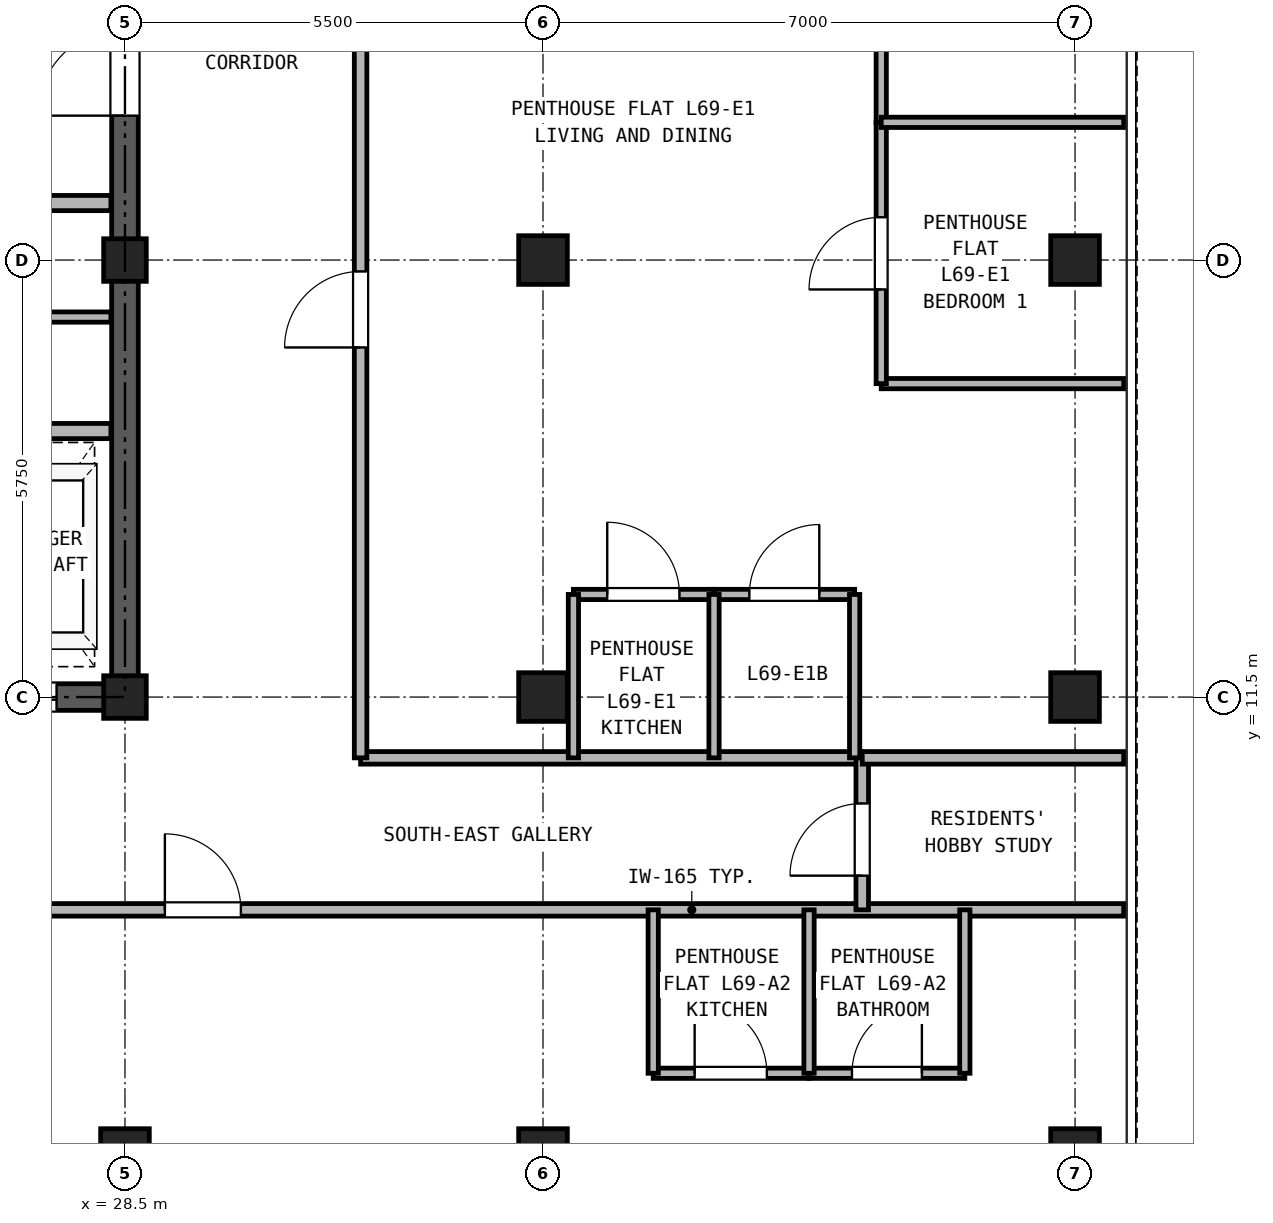
"""IFC4 building model, lengths in metres.
Left out: names, types, materials, properties, quantities, classifications, styles, units other than length and angle.
Written with IfcOpenShell. Run it as: python <this file> out.ifc"""

import sys

from ifc_helpers import new_model, si_unit, direction, frame, frame_2d, origin, origin_2d, place, context, subcontext, project, spatial, rectangle, hollow_rectangle, extrude, source, transform, mapped, element, fill, save


model = new_model("IFC4")
c1 = context("Model", 3, precision=1e-05, world=origin(), true_north=direction((0.0, 1.0)))
c2 = subcontext(c1, "Body", "Model", "MODEL_VIEW")
j1 = project(units=[si_unit("LENGTHUNIT", "METRE"), si_unit("PLANEANGLEUNIT", "RADIAN")], contexts=[c1])
p1 = place(None, origin())
s1 = spatial("IfcSite", under=j1, at=p1, CompositionType="ELEMENT")
p2 = place(p1, origin())
s2 = spatial("IfcBuilding", under=s1, at=p2, CompositionType="ELEMENT")
p3 = place(p2, frame((0.0, 0.0, 242.5)))
s3 = spatial("IfcBuildingStorey", under=s2, at=p3, CompositionType="ELEMENT", Elevation=242.5)
m1 = source(origin(), c2, "Body", "SweptSolid", [
    extrude(hollow_rectangle(XDim=0.64, YDim=0.64, WallThickness=0.035, at=origin_2d()), origin(), (0.0, 0.0, 1.0), 2.98),
])
for number, where, z_axis, x_axis in (
    (1, (41.0, 5.5, 0.0), (0.0, 0.0, 1.0), (1.0, 0.0, 0.0)),
    (2, (41.0, 11.5, 0.0), (0.0, 0.0, 1.0), (1.0, 0.0, 0.0)),
    (3, (41.0, 17.25, 0.0), (0.0, 0.0, 1.0), (1.0, 0.0, 0.0)),
    (4, (28.5, 5.5, 0.0), (0.0, 0.0, 1.0), (1.0, 0.0, 0.0)),
):
    element("IfcColumn", number, at=place(p3, frame(where, z_axis=z_axis, x_axis=x_axis)), inside=s3, PredefinedType="COLUMN", context=c2, shape_type="MappedRepresentation", body=[
        mapped(m1, transform((0.0, 0.0, 0.0), x_axis=(1.0, 0.0, 0.0), y_axis=(0.0, 1.0, 0.0), z_axis=(0.0, 0.0, 1.0), scale=1.0)),
    ])
m2 = source(origin(), c2, "Body", "SweptSolid", [
    extrude(hollow_rectangle(XDim=0.56, YDim=0.56, WallThickness=0.03, at=origin_2d()), origin(), (0.0, 0.0, 1.0), 2.98),
])
for number, where, z_axis, x_axis in (
    (5, (28.5, 11.5, 0.0), (0.0, 0.0, 1.0), (1.0, 0.0, 0.0)),
    (6, (28.5, 17.25, 0.0), (0.0, 0.0, 1.0), (1.0, 0.0, 0.0)),
):
    element("IfcColumn", number, at=place(p3, frame(where, z_axis=z_axis, x_axis=x_axis)), inside=s3, PredefinedType="COLUMN", context=c2, shape_type="MappedRepresentation", body=[
        mapped(m2, transform((0.0, 0.0, 0.0), x_axis=(1.0, 0.0, 0.0), y_axis=(0.0, 1.0, 0.0), z_axis=(0.0, 0.0, 1.0), scale=1.0)),
    ])
for number, where, z_axis, x_axis in (
    (7, (34.0, 5.5, 0.0), (0.0, 0.0, 1.0), (1.0, 0.0, 0.0)),
    (8, (34.0, 11.5, 0.0), (0.0, 0.0, 1.0), (1.0, 0.0, 0.0)),
    (9, (34.0, 17.25, 0.0), (0.0, 0.0, 1.0), (1.0, 0.0, 0.0)),
):
    element("IfcColumn", number, at=place(p3, frame(where, z_axis=z_axis, x_axis=x_axis)), inside=s3, PredefinedType="COLUMN", context=c2, shape_type="MappedRepresentation", body=[
        mapped(m1, transform((0.0, 0.0, 0.0), x_axis=(1.0, 0.0, 0.0), y_axis=(0.0, 1.0, 0.0), z_axis=(0.0, 0.0, 1.0), scale=1.0)),
    ])
p4 = place(p3, frame((18.325, 11.5, 0.0), z_axis=(0.0, 0.0, 1.0), x_axis=(1.0, 0.0, 0.0)))
e10 = element("IfcWall", 10, at=p4, inside=s3, PredefinedType="SHEAR", context=c2, shape_type="SweptSolid", body=[
    extrude(rectangle(XDim=10.35, YDim=0.35, at=frame_2d((5.175, 0.0))), origin(), (0.0, 0.0, 1.0), 2.98),
])
p5 = place(p4, frame((1.775, 0.0, 0.0)))
e11 = element("IfcOpeningElement", 11, at=p5, cuts=e10, PredefinedType="OPENING", context=c2, shape_type="SweptSolid", body=[
    extrude(rectangle(XDim=0.95, YDim=2.15, at=frame_2d((0.475, 1.075))), frame((0.0, 0.185, 0.0), z_axis=(0.0, -1.0, 0.0), x_axis=(1.0, 0.0, 0.0)), (0.0, 0.0, 1.0), 0.37),
])
p6 = place(p4, frame((5.275, 0.0, 0.0)))
e12 = element("IfcOpeningElement", 12, at=p6, cuts=e10, PredefinedType="OPENING", context=c2, shape_type="SweptSolid", body=[
    extrude(rectangle(XDim=0.95, YDim=2.15, at=frame_2d((0.475, 1.075))), frame((0.0, 0.185, 0.0), z_axis=(0.0, -1.0, 0.0), x_axis=(1.0, 0.0, 0.0)), (0.0, 0.0, 1.0), 0.37),
])
p7 = place(p4, frame((8.175, 0.0, 0.0)))
e13 = element("IfcOpeningElement", 13, at=p7, cuts=e10, PredefinedType="OPENING", context=c2, shape_type="SweptSolid", body=[
    extrude(rectangle(XDim=1.1, YDim=2.25, at=frame_2d((0.55, 1.125))), frame((0.0, 0.185, 0.0), z_axis=(0.0, -1.0, 0.0), x_axis=(1.0, 0.0, 0.0)), (0.0, 0.0, 1.0), 0.37),
])
p8 = place(p3, frame((28.5, 11.675, 0.0), z_axis=(0.0, 0.0, 1.0), x_axis=(0.0, 1.0, 0.0)))
e14 = element("IfcWall", 14, at=p8, inside=s3, PredefinedType="SHEAR", context=c2, shape_type="SweptSolid", body=[
    extrude(rectangle(XDim=16.9, YDim=0.35, at=frame_2d((8.45, 0.0))), origin(), (0.0, 0.0, 1.0), 2.98),
])
p9 = place(p8, frame((7.475, 0.0, 0.0)))
e15 = element("IfcOpeningElement", 15, at=p9, cuts=e14, PredefinedType="OPENING", context=c2, shape_type="SweptSolid", body=[
    extrude(rectangle(XDim=1.15, YDim=2.2, at=frame_2d((0.575, 1.1))), frame((0.0, 0.185, 0.0), z_axis=(0.0, -1.0, 0.0), x_axis=(1.0, 0.0, 0.0)), (0.0, 0.0, 1.0), 0.37),
])
p10 = place(p3, frame((18.685, 18.0, 0.0), z_axis=(0.0, 0.0, 1.0), x_axis=(1.0, 0.0, 0.0)))
e16 = element("IfcWall", 16, at=p10, inside=s3, PredefinedType="PARTITIONING", context=c2, shape_type="SweptSolid", body=[
    extrude(rectangle(XDim=9.63, YDim=0.2, at=frame_2d((4.815, 0.0))), origin(), (0.0, 0.0, 1.0), 2.98),
])
p11 = place(p10, frame((0.565, 0.0, 0.0)))
e17 = element("IfcOpeningElement", 17, at=p11, cuts=e16, PredefinedType="OPENING", context=c2, shape_type="SweptSolid", body=[
    extrude(rectangle(XDim=1.3, YDim=2.3, at=frame_2d((0.65, 1.15))), frame((0.0, 0.11, 0.0), z_axis=(0.0, -1.0, 0.0), x_axis=(1.0, 0.0, 0.0)), (0.0, 0.0, 1.0), 0.22),
])
p12 = place(p10, frame((2.665, 0.0, 0.0)))
e18 = element("IfcOpeningElement", 18, at=p12, cuts=e16, PredefinedType="OPENING", context=c2, shape_type="SweptSolid", body=[
    extrude(rectangle(XDim=1.3, YDim=2.3, at=frame_2d((0.65, 1.15))), frame((0.0, 0.11, 0.0), z_axis=(0.0, -1.0, 0.0), x_axis=(1.0, 0.0, 0.0)), (0.0, 0.0, 1.0), 0.22),
])
p13 = place(p10, frame((7.165, 0.0, 0.0)))
e19 = element("IfcOpeningElement", 19, at=p13, cuts=e16, PredefinedType="OPENING", context=c2, shape_type="SweptSolid", body=[
    extrude(rectangle(XDim=1.0, YDim=2.15, at=frame_2d((0.5, 1.075))), frame((0.0, 0.11, 0.0), z_axis=(0.0, -1.0, 0.0), x_axis=(1.0, 0.0, 0.0)), (0.0, 0.0, 1.0), 0.22),
])
p14 = place(p3, frame((18.685, 15.0, 0.0), z_axis=(0.0, 0.0, 1.0), x_axis=(1.0, 0.0, 0.0)))
e20 = element("IfcWall", 20, at=p14, inside=s3, PredefinedType="PARTITIONING", context=c2, shape_type="SweptSolid", body=[
    extrude(rectangle(XDim=9.63, YDim=0.2, at=frame_2d((4.815, 0.0))), origin(), (0.0, 0.0, 1.0), 2.98),
])
p15 = place(p3, frame((23.3, 16.5, 0.0), z_axis=(0.0, 0.0, 1.0), x_axis=(1.0, 0.0, 0.0)))
e21 = element("IfcWall", 21, at=p15, inside=s3, PredefinedType="PARTITIONING", context=c2, shape_type="SweptSolid", body=[
    extrude(rectangle(XDim=5.015, YDim=0.135, at=frame_2d((2.507, 0.0))), origin(), (0.0, 0.0, 1.0), 2.98),
])
p16 = place(p15, frame((2.55, 0.0, 0.0)))
e22 = element("IfcOpeningElement", 22, at=p16, cuts=e21, PredefinedType="OPENING", context=c2, shape_type="SweptSolid", body=[
    extrude(rectangle(XDim=0.9, YDim=2.05, at=frame_2d((0.45, 1.025))), frame((0.0, 0.077, 0.0), z_axis=(0.0, -1.0, 0.0), x_axis=(1.0, 0.0, 0.0)), (0.0, 0.0, 1.0), 0.155),
])
p17 = place(p3, frame((5.36, 8.7, 0.0), z_axis=(0.0, 0.0, 1.0), x_axis=(1.0, 0.0, 0.0)))
e23 = element("IfcWall", 23, at=p17, inside=s3, PredefinedType="PARTITIONING", context=c2, shape_type="SweptSolid", body=[
    extrude(rectangle(XDim=36.28, YDim=0.165, at=frame_2d((18.14, 0.0))), origin(), (0.0, 0.0, 1.0), 2.655),
])
p18 = place(p17, frame((11.615, 0.0, 0.0)))
e24 = element("IfcOpeningElement", 24, at=p18, cuts=e23, PredefinedType="OPENING", context=c2, shape_type="SweptSolid", body=[
    extrude(rectangle(XDim=1.0, YDim=2.15, at=frame_2d((0.5, 1.075))), frame((0.0, 0.093, 0.0), z_axis=(0.0, -1.0, 0.0), x_axis=(1.0, 0.0, 0.0)), (0.0, 0.0, 1.0), 0.185),
])
p19 = place(p17, frame((23.665, 0.0, 0.0)))
e25 = element("IfcOpeningElement", 25, at=p19, cuts=e23, PredefinedType="OPENING", context=c2, shape_type="SweptSolid", body=[
    extrude(rectangle(XDim=1.0, YDim=2.15, at=frame_2d((0.5, 1.075))), frame((0.0, 0.093, 0.0), z_axis=(0.0, -1.0, 0.0), x_axis=(1.0, 0.0, 0.0)), (0.0, 0.0, 1.0), 0.185),
])
p20 = place(p3, frame((31.6, 10.7, 0.0), z_axis=(0.0, 0.0, 1.0), x_axis=(1.0, 0.0, 0.0)))
e26 = element("IfcWall", 26, at=p20, inside=s3, PredefinedType="PARTITIONING", context=c2, shape_type="SweptSolid", body=[
    extrude(rectangle(XDim=6.6, YDim=0.165, at=frame_2d((3.3, 0.0))), origin(), (0.0, 0.0, 1.0), 2.98),
])
p21 = place(p3, frame((38.2, 8.7, 0.0), z_axis=(0.0, 0.0, 1.0), x_axis=(0.0, 1.0, 0.0)))
e27 = element("IfcWall", 27, at=p21, inside=s3, PredefinedType="PARTITIONING", context=c2, shape_type="SweptSolid", body=[
    extrude(rectangle(XDim=2.0, YDim=0.165, at=frame_2d((1.0, 0.0))), origin(), (0.0, 0.0, 1.0), 2.98),
])
p22 = place(p21, frame((0.45, 0.0, 0.0)))
e28 = element("IfcOpeningElement", 28, at=p22, cuts=e27, PredefinedType="OPENING", context=c2, shape_type="SweptSolid", body=[
    extrude(rectangle(XDim=0.95, YDim=2.15, at=frame_2d((0.475, 1.075))), frame((0.0, 0.093, 0.0), z_axis=(0.0, -1.0, 0.0), x_axis=(1.0, 0.0, 0.0)), (0.0, 0.0, 1.0), 0.185),
])
p23 = place(p3, frame((31.6, 10.7, 0.0), z_axis=(0.0, 0.0, 1.0), x_axis=(0.0, 1.0, 0.0)))
e29 = element("IfcWall", 29, at=p23, inside=s3, PredefinedType="PARTITIONING", context=c2, shape_type="SweptSolid", body=[
    extrude(rectangle(XDim=24.44, YDim=0.165, at=frame_2d((12.22, 0.0))), origin(), (0.0, 0.0, 1.0), 2.98),
])
p24 = place(p23, frame((5.4, 0.0, 0.0)))
e30 = element("IfcOpeningElement", 30, at=p24, cuts=e29, PredefinedType="OPENING", context=c2, shape_type="SweptSolid", body=[
    extrude(rectangle(XDim=1.0, YDim=2.15, at=frame_2d((0.5, 1.075))), frame((0.0, 0.093, 0.0), z_axis=(0.0, -1.0, 0.0), x_axis=(1.0, 0.0, 0.0)), (0.0, 0.0, 1.0), 0.185),
])
p25 = place(p23, frame((15.7, 0.0, 0.0)))
e31 = element("IfcOpeningElement", 31, at=p25, cuts=e29, PredefinedType="OPENING", context=c2, shape_type="SweptSolid", body=[
    extrude(rectangle(XDim=1.0, YDim=2.15, at=frame_2d((0.5, 1.075))), frame((0.0, 0.093, 0.0), z_axis=(0.0, -1.0, 0.0), x_axis=(1.0, 0.0, 0.0)), (0.0, 0.0, 1.0), 0.185),
])
p26 = place(p3, frame((35.45, 6.55, 0.0), z_axis=(0.0, 0.0, 1.0), x_axis=(1.0, 0.0, 0.0)))
e32 = element("IfcWall", 32, at=p26, inside=s3, PredefinedType="PARTITIONING", context=c2, shape_type="SweptSolid", body=[
    extrude(rectangle(XDim=2.05, YDim=0.135, at=frame_2d((1.025, 0.0))), origin(), (0.0, 0.0, 1.0), 2.98),
])
p27 = place(p26, frame((0.545, 0.0, 0.0)))
e33 = element("IfcOpeningElement", 33, at=p27, cuts=e32, PredefinedType="OPENING", context=c2, shape_type="SweptSolid", body=[
    extrude(rectangle(XDim=0.95, YDim=2.15, at=frame_2d((0.475, 1.075))), frame((0.0, 0.077, 0.0), z_axis=(0.0, -1.0, 0.0), x_axis=(1.0, 0.0, 0.0)), (0.0, 0.0, 1.0), 0.155),
])
p28 = place(p3, frame((37.5, 6.55, 0.0), z_axis=(0.0, 0.0, 1.0), x_axis=(1.0, 0.0, 0.0)))
e34 = element("IfcWall", 34, at=p28, inside=s3, PredefinedType="PARTITIONING", context=c2, shape_type="SweptSolid", body=[
    extrude(rectangle(XDim=2.05, YDim=0.135, at=frame_2d((1.025, 0.0))), origin(), (0.0, 0.0, 1.0), 2.98),
])
p29 = place(p28, frame((0.565, 0.0, 0.0)))
e35 = element("IfcOpeningElement", 35, at=p29, cuts=e34, PredefinedType="OPENING", context=c2, shape_type="SweptSolid", body=[
    extrude(rectangle(XDim=0.92, YDim=2.1, at=frame_2d((0.46, 1.05))), frame((0.0, 0.077, 0.0), z_axis=(0.0, -1.0, 0.0), x_axis=(1.0, 0.0, 0.0)), (0.0, 0.0, 1.0), 0.155),
])
for number, where, z_axis, x_axis in (
    (36, (35.45, 6.55, 0.0), (0.0, 0.0, 1.0), (0.0, 1.0, 0.0)),
    (37, (37.5, 6.55, 0.0), (0.0, 0.0, 1.0), (0.0, 1.0, 0.0)),
    (38, (39.55, 6.55, 0.0), (0.0, 0.0, 1.0), (0.0, 1.0, 0.0)),
):
    element("IfcWall", number, at=place(p3, frame(where, z_axis=z_axis, x_axis=x_axis)), inside=s3, PredefinedType="PARTITIONING", context=c2, shape_type="SweptSolid", body=[
        extrude(rectangle(XDim=2.15, YDim=0.135, at=frame_2d((1.075, 0.0))), origin(), (0.0, 0.0, 1.0), 2.98),
    ])
p30 = place(p3, frame((38.2, 10.7, 0.0), z_axis=(0.0, 0.0, 1.0), x_axis=(1.0, 0.0, 0.0)))
e39 = element("IfcWall", 39, at=p30, inside=s3, PredefinedType="PARTITIONING", context=c2, shape_type="SweptSolid", body=[
    extrude(rectangle(XDim=3.44, YDim=0.165, at=frame_2d((1.72, 0.0))), origin(), (0.0, 0.0, 1.0), 2.98),
])
p31 = place(p3, frame((34.4, 12.85, 0.0), z_axis=(0.0, 0.0, 1.0), x_axis=(1.0, 0.0, 0.0)))
e40 = element("IfcWall", 40, at=p31, inside=s3, PredefinedType="PARTITIONING", context=c2, shape_type="SweptSolid", body=[
    extrude(rectangle(XDim=1.85, YDim=0.135, at=frame_2d((0.925, 0.0))), origin(), (0.0, 0.0, 1.0), 2.98),
])
p32 = place(p31, frame((0.445, 0.0, 0.0)))
e41 = element("IfcOpeningElement", 41, at=p32, cuts=e40, PredefinedType="OPENING", context=c2, shape_type="SweptSolid", body=[
    extrude(rectangle(XDim=0.95, YDim=2.15, at=frame_2d((0.475, 1.075))), frame((0.0, 0.077, 0.0), z_axis=(0.0, -1.0, 0.0), x_axis=(1.0, 0.0, 0.0)), (0.0, 0.0, 1.0), 0.155),
])
p33 = place(p3, frame((36.25, 12.85, 0.0), z_axis=(0.0, 0.0, 1.0), x_axis=(1.0, 0.0, 0.0)))
e42 = element("IfcWall", 42, at=p33, inside=s3, PredefinedType="PARTITIONING", context=c2, shape_type="SweptSolid", body=[
    extrude(rectangle(XDim=1.85, YDim=0.135, at=frame_2d((0.925, 0.0))), origin(), (0.0, 0.0, 1.0), 2.98),
])
p34 = place(p33, frame((0.465, 0.0, 0.0)))
e43 = element("IfcOpeningElement", 43, at=p34, cuts=e42, PredefinedType="OPENING", context=c2, shape_type="SweptSolid", body=[
    extrude(rectangle(XDim=0.92, YDim=2.1, at=frame_2d((0.46, 1.05))), frame((0.0, 0.077, 0.0), z_axis=(0.0, -1.0, 0.0), x_axis=(1.0, 0.0, 0.0)), (0.0, 0.0, 1.0), 0.155),
])
for number, where, z_axis, x_axis in (
    (44, (34.4, 10.7, 0.0), (0.0, 0.0, 1.0), (0.0, 1.0, 0.0)),
    (45, (36.25, 10.7, 0.0), (0.0, 0.0, 1.0), (0.0, 1.0, 0.0)),
    (46, (38.1, 10.7, 0.0), (0.0, 0.0, 1.0), (0.0, 1.0, 0.0)),
):
    element("IfcWall", number, at=place(p3, frame(where, z_axis=z_axis, x_axis=x_axis)), inside=s3, PredefinedType="PARTITIONING", context=c2, shape_type="SweptSolid", body=[
        extrude(rectangle(XDim=2.15, YDim=0.135, at=frame_2d((1.075, 0.0))), origin(), (0.0, 0.0, 1.0), 2.98),
    ])
p35 = place(p3, frame((38.45, 15.624, 0.0), z_axis=(0.0, 0.0, 1.0), x_axis=(1.0, 0.0, 0.0)))
e47 = element("IfcWall", 47, at=p35, inside=s3, PredefinedType="PARTITIONING", context=c2, shape_type="SweptSolid", body=[
    extrude(rectangle(XDim=3.19, YDim=0.135, at=frame_2d((1.595, 0.0))), origin(), (0.0, 0.0, 1.0), 2.98),
])
p36 = place(p3, frame((38.45, 15.624, 0.0), z_axis=(0.0, 0.0, 1.0), x_axis=(0.0, 1.0, 0.0)))
e48 = element("IfcWall", 48, at=p36, inside=s3, PredefinedType="PARTITIONING", context=c2, shape_type="SweptSolid", body=[
    extrude(rectangle(XDim=3.438, YDim=0.135, at=frame_2d((1.719, 0.0))), origin(), (0.0, 0.0, 1.0), 2.98),
])
p37 = place(p36, frame((1.239, 0.0, 0.0)))
e49 = element("IfcOpeningElement", 49, at=p37, cuts=e48, PredefinedType="OPENING", context=c2, shape_type="SweptSolid", body=[
    extrude(rectangle(XDim=0.95, YDim=2.15, at=frame_2d((0.475, 1.075))), frame((0.0, 0.077, 0.0), z_axis=(0.0, -1.0, 0.0), x_axis=(1.0, 0.0, 0.0)), (0.0, 0.0, 1.0), 0.155),
])
p38 = place(p3, frame((38.45, 19.062, 0.0), z_axis=(0.0, 0.0, 1.0), x_axis=(0.0, 1.0, 0.0)))
e50 = element("IfcWall", 50, at=p38, inside=s3, PredefinedType="PARTITIONING", context=c2, shape_type="SweptSolid", body=[
    extrude(rectangle(XDim=3.438, YDim=0.135, at=frame_2d((1.719, 0.0))), origin(), (0.0, 0.0, 1.0), 2.98),
])
p39 = place(p38, frame((1.239, 0.0, 0.0)))
e51 = element("IfcOpeningElement", 51, at=p39, cuts=e50, PredefinedType="OPENING", context=c2, shape_type="SweptSolid", body=[
    extrude(rectangle(XDim=0.95, YDim=2.15, at=frame_2d((0.475, 1.075))), frame((0.0, 0.077, 0.0), z_axis=(0.0, -1.0, 0.0), x_axis=(1.0, 0.0, 0.0)), (0.0, 0.0, 1.0), 0.155),
])
p40 = place(p3, frame((38.45, 19.062, 0.0), z_axis=(0.0, 0.0, 1.0), x_axis=(1.0, 0.0, 0.0)))
e52 = element("IfcWall", 52, at=p40, inside=s3, PredefinedType="PARTITIONING", context=c2, shape_type="SweptSolid", body=[
    extrude(rectangle(XDim=3.19, YDim=0.135, at=frame_2d((1.595, 0.0))), origin(), (0.0, 0.0, 1.0), 2.98),
])
p41 = place(p9, origin())
e53 = element("IfcDoor", 53, at=p41, inside=s3, OperationType="SINGLE_SWING_LEFT", PredefinedType="DOOR", context=c2, shape_type="SweptSolid", body=[
    extrude(rectangle(XDim=1.15, YDim=2.2, at=frame_2d((0.575, 1.1))), frame((0.0, 0.025, 0.0), z_axis=(0.0, -1.0, 0.0), x_axis=(1.0, 0.0, 0.0)), (0.0, 0.0, 1.0), 0.05),
])
fill(e15, e53)
p42 = place(p7, frame((1.1, 0.0, 0.0), z_axis=(0.0, 0.0, 1.0), x_axis=(-1.0, 0.0, 0.0)))
e54 = element("IfcDoor", 54, at=p42, inside=s3, OperationType="DOUBLE_DOOR_SLIDING", PredefinedType="DOOR", context=c2, shape_type="SweptSolid", body=[
    extrude(rectangle(XDim=1.1, YDim=2.25, at=frame_2d((0.55, 1.125))), frame((0.0, 0.025, 0.0), z_axis=(0.0, -1.0, 0.0), x_axis=(1.0, 0.0, 0.0)), (0.0, 0.0, 1.0), 0.05),
])
fill(e13, e54)
p43 = place(p27, origin())
e55 = element("IfcDoor", 55, at=p43, inside=s3, OperationType="SINGLE_SWING_LEFT", PredefinedType="DOOR", context=c2, shape_type="SweptSolid", body=[
    extrude(rectangle(XDim=0.95, YDim=2.15, at=frame_2d((0.475, 1.075))), frame((0.0, 0.025, 0.0), z_axis=(0.0, -1.0, 0.0), x_axis=(1.0, 0.0, 0.0)), (0.0, 0.0, 1.0), 0.05),
])
fill(e33, e55)
p44 = place(p29, origin())
e56 = element("IfcDoor", 56, at=p44, inside=s3, OperationType="SINGLE_SWING_RIGHT", PredefinedType="DOOR", context=c2, shape_type="SweptSolid", body=[
    extrude(rectangle(XDim=0.92, YDim=2.1, at=frame_2d((0.46, 1.05))), frame((0.0, 0.025, 0.0), z_axis=(0.0, -1.0, 0.0), x_axis=(1.0, 0.0, 0.0)), (0.0, 0.0, 1.0), 0.05),
])
fill(e35, e56)
p45 = place(p19, frame((1.0, 0.0, 0.0), z_axis=(0.0, 0.0, 1.0), x_axis=(-1.0, 0.0, 0.0)))
e57 = element("IfcDoor", 57, at=p45, inside=s3, OperationType="SINGLE_SWING_LEFT", PredefinedType="DOOR", context=c2, shape_type="SweptSolid", body=[
    extrude(rectangle(XDim=1.0, YDim=2.15, at=frame_2d((0.5, 1.075))), frame((0.0, 0.025, 0.0), z_axis=(0.0, -1.0, 0.0), x_axis=(1.0, 0.0, 0.0)), (0.0, 0.0, 1.0), 0.05),
])
fill(e25, e57)
p46 = place(p22, origin())
e58 = element("IfcDoor", 58, at=p46, inside=s3, OperationType="SINGLE_SWING_LEFT", PredefinedType="DOOR", context=c2, shape_type="SweptSolid", body=[
    extrude(rectangle(XDim=0.95, YDim=2.15, at=frame_2d((0.475, 1.075))), frame((0.0, 0.025, 0.0), z_axis=(0.0, -1.0, 0.0), x_axis=(1.0, 0.0, 0.0)), (0.0, 0.0, 1.0), 0.05),
])
fill(e28, e58)
p47 = place(p32, origin())
e59 = element("IfcDoor", 59, at=p47, inside=s3, OperationType="SINGLE_SWING_LEFT", PredefinedType="DOOR", context=c2, shape_type="SweptSolid", body=[
    extrude(rectangle(XDim=0.95, YDim=2.15, at=frame_2d((0.475, 1.075))), frame((0.0, 0.025, 0.0), z_axis=(0.0, -1.0, 0.0), x_axis=(1.0, 0.0, 0.0)), (0.0, 0.0, 1.0), 0.05),
])
fill(e41, e59)
p48 = place(p34, origin())
e60 = element("IfcDoor", 60, at=p48, inside=s3, OperationType="SINGLE_SWING_RIGHT", PredefinedType="DOOR", context=c2, shape_type="SweptSolid", body=[
    extrude(rectangle(XDim=0.92, YDim=2.1, at=frame_2d((0.46, 1.05))), frame((0.0, 0.025, 0.0), z_axis=(0.0, -1.0, 0.0), x_axis=(1.0, 0.0, 0.0)), (0.0, 0.0, 1.0), 0.05),
])
fill(e43, e60)
p49 = place(p37, frame((0.95, 0.0, 0.0), z_axis=(0.0, 0.0, 1.0), x_axis=(-1.0, 0.0, 0.0)))
e61 = element("IfcDoor", 61, at=p49, inside=s3, OperationType="SINGLE_SWING_LEFT", PredefinedType="DOOR", context=c2, shape_type="SweptSolid", body=[
    extrude(rectangle(XDim=0.95, YDim=2.15, at=frame_2d((0.475, 1.075))), frame((0.0, 0.025, 0.0), z_axis=(0.0, -1.0, 0.0), x_axis=(1.0, 0.0, 0.0)), (0.0, 0.0, 1.0), 0.05),
])
fill(e49, e61)
p50 = place(p24, frame((1.0, 0.0, 0.0), z_axis=(0.0, 0.0, 1.0), x_axis=(-1.0, 0.0, 0.0)))
e62 = element("IfcDoor", 62, at=p50, inside=s3, OperationType="SINGLE_SWING_LEFT", PredefinedType="DOOR", context=c2, shape_type="SweptSolid", body=[
    extrude(rectangle(XDim=1.0, YDim=2.15, at=frame_2d((0.5, 1.075))), frame((0.0, 0.025, 0.0), z_axis=(0.0, -1.0, 0.0), x_axis=(1.0, 0.0, 0.0)), (0.0, 0.0, 1.0), 0.05),
])
fill(e30, e62)
save(model, sys.argv[1])
